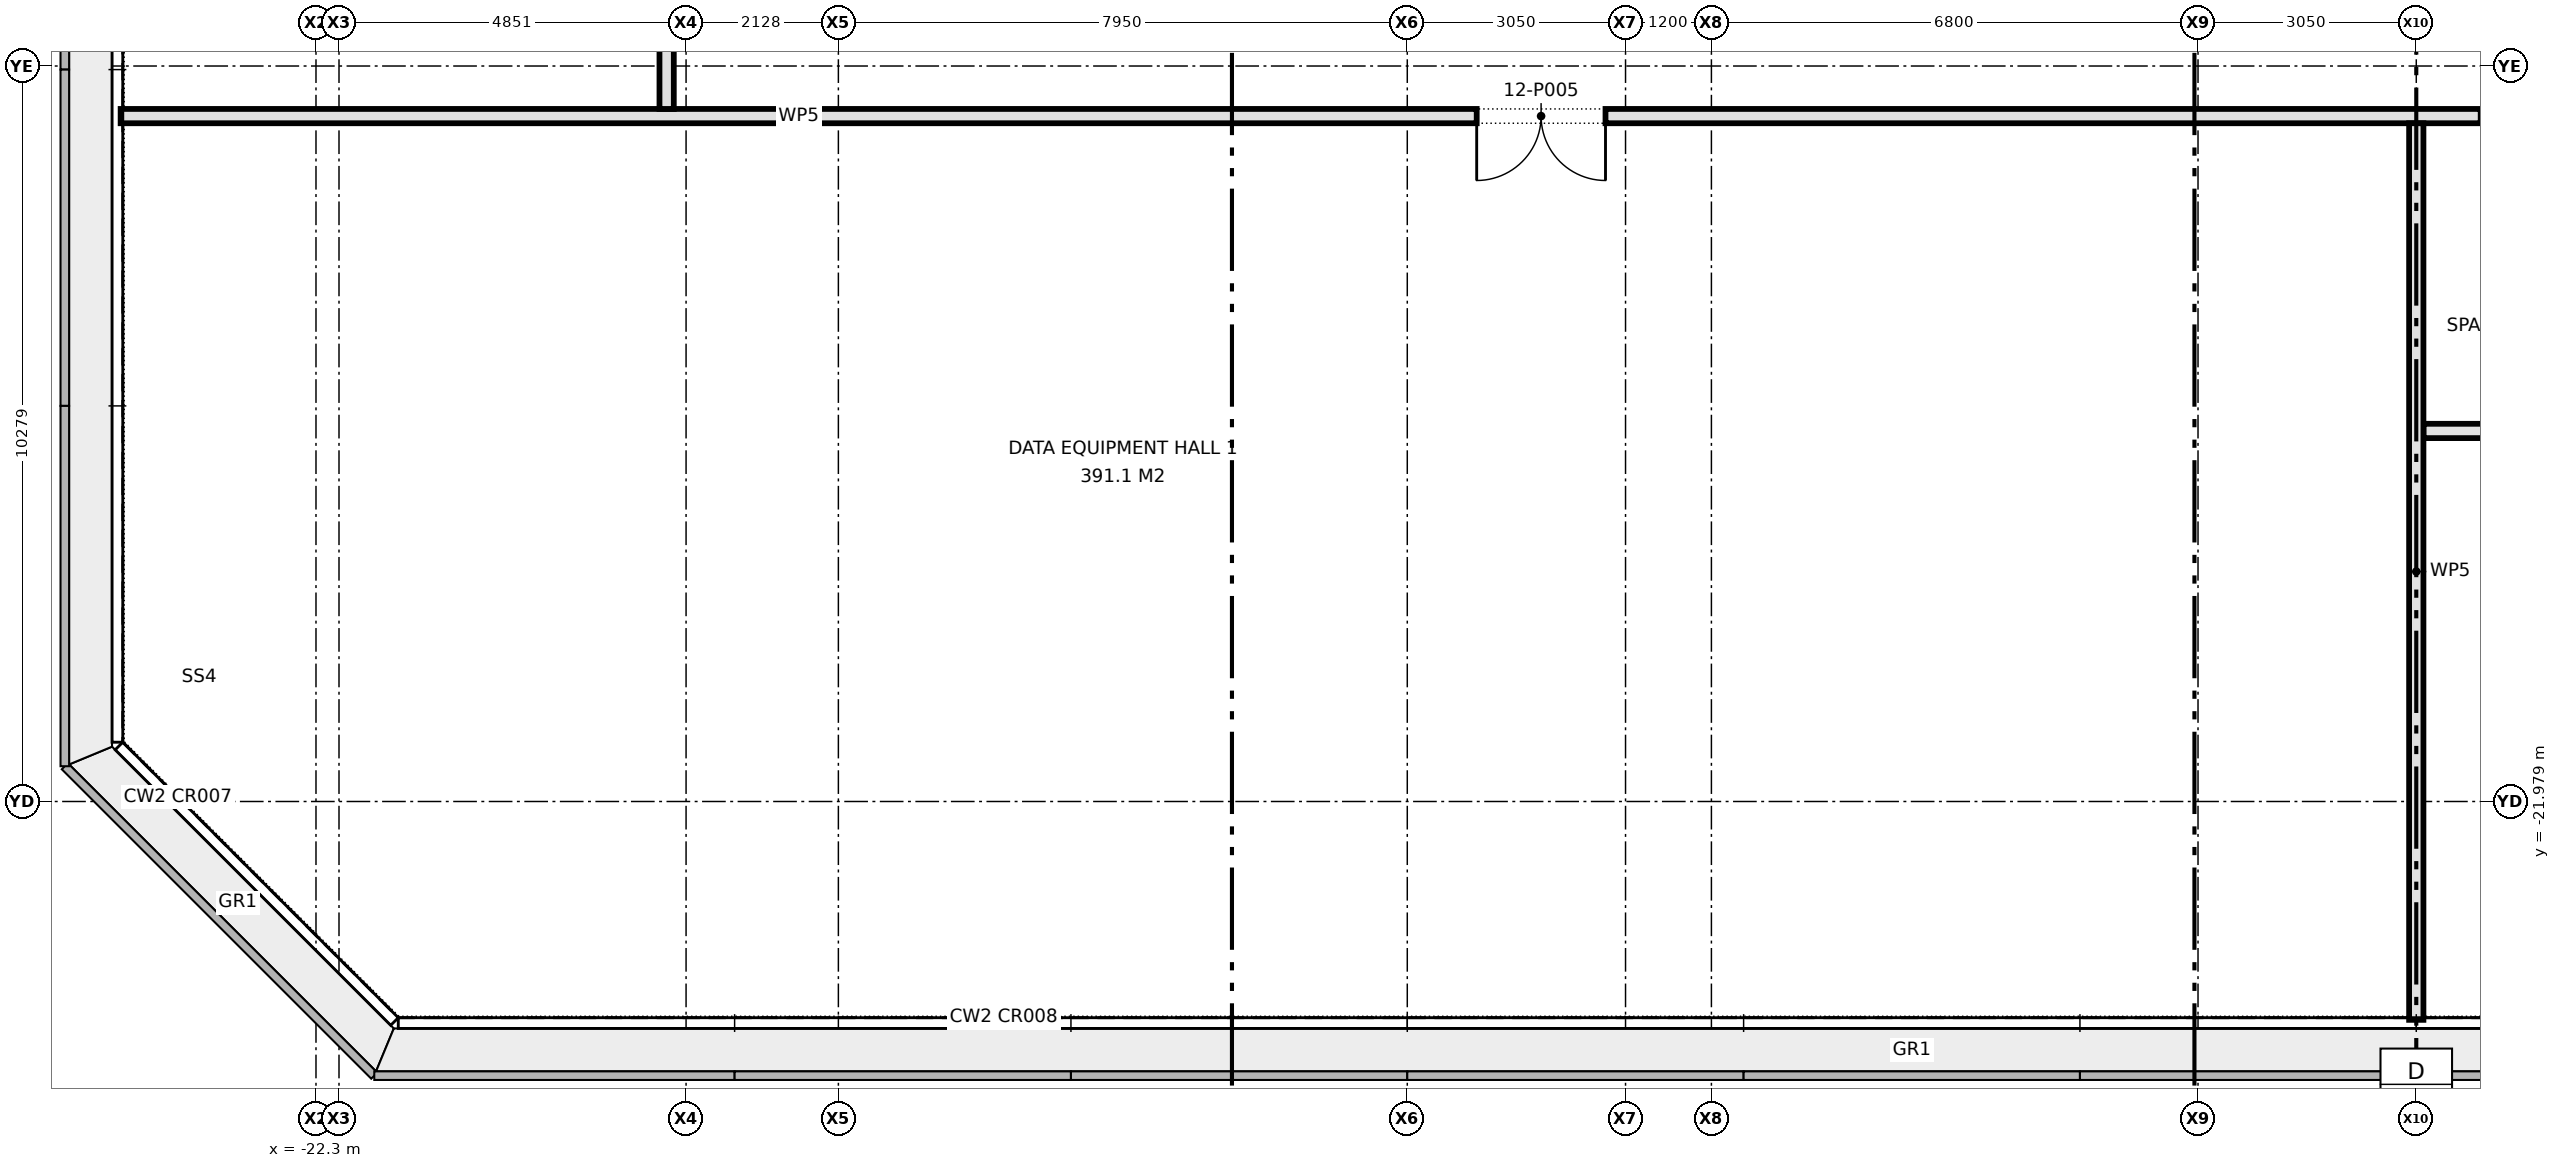
"""IFC4 building model, lengths in metres.
Left out: names, types, materials, properties, quantities, classifications, styles, units other than length and angle.
Written with IfcOpenShell. Run it as: python <this file> out.ifc"""

import sys

from ifc_helpers import new_model, si_unit, direction, frame, frame_2d, origin, place, context, subcontext, project, spatial, rectangle, extrude, element, fill, save


model = new_model("IFC4")
c1 = context("Model", 3, precision=1e-05, world=origin(), true_north=direction((0.0, 1.0)))
c2 = subcontext(c1, "Body", "Model", "MODEL_VIEW")
j1 = project(units=[si_unit("LENGTHUNIT", "METRE"), si_unit("PLANEANGLEUNIT", "RADIAN")], contexts=[c1])
p1 = place(None, origin())
s1 = spatial("IfcSite", under=j1, at=p1, CompositionType="ELEMENT")
p2 = place(p1, origin())
s2 = spatial("IfcBuilding", under=s1, at=p2, CompositionType="ELEMENT")
p3 = place(p2, frame((0.0, 0.0, 54.5)))
s3 = spatial("IfcBuildingStorey", under=s2, at=p3, CompositionType="ELEMENT", Elevation=54.5)
p4 = place(p3, frame((7.15, -16.8, 0.0), z_axis=(0.0, 0.0, 1.0), x_axis=(1.0, 0.0, 0.0)))
e1 = element("IfcWall", 1, at=p4, inside=s3, PredefinedType="PARTITIONING", context=c2, shape_type="SweptSolid", body=[
    extrude(rectangle(XDim=3.0, YDim=0.2, at=frame_2d((1.5, 0.0))), origin(), (0.0, 0.0, 1.0), 4.575),
])
p5 = place(p3, frame((-25.03, -12.4, 0.0), z_axis=(0.0, 0.0, 1.0), x_axis=(1.0, 0.0, 0.0)))
e2 = element("IfcWall", 2, at=p5, inside=s3, PredefinedType="PARTITIONING", context=c2, shape_type="SweptSolid", body=[
    extrude(rectangle(XDim=50.06, YDim=0.2, at=frame_2d((25.03, 0.0))), origin(), (0.0, 0.0, 1.0), 4.575),
])
p6 = place(p5, frame((18.95, 0.0, 0.0)))
e3 = element("IfcOpeningElement", 3, at=p6, cuts=e2, PredefinedType="OPENING", context=c2, shape_type="SweptSolid", body=[
    extrude(rectangle(XDim=1.8, YDim=2.1, at=frame_2d((0.9, 1.05))), frame((0.0, 0.11, 0.0), z_axis=(0.0, -1.0, 0.0), x_axis=(1.0, 0.0, 0.0)), (0.0, 0.0, 1.0), 0.22),
])
p7 = place(p5, frame((37.86, 0.0, 0.0)))
e4 = element("IfcOpeningElement", 4, at=p7, cuts=e2, PredefinedType="OPENING", context=c2, shape_type="SweptSolid", body=[
    extrude(rectangle(XDim=1.8, YDim=2.1, at=frame_2d((0.9, 1.05))), frame((0.0, 0.11, 0.0), z_axis=(0.0, -1.0, 0.0), x_axis=(1.0, 0.0, 0.0)), (0.0, 0.0, 1.0), 0.22),
])
p8 = place(p5, frame((32.98, 0.0, 0.0)))
e5 = element("IfcOpeningElement", 5, at=p8, cuts=e2, PredefinedType="OPENING", context=c2, shape_type="SweptSolid", body=[
    extrude(rectangle(XDim=1.2, YDim=2.1, at=frame_2d((0.6, 1.05))), frame((0.0, 0.11, 0.0), z_axis=(0.0, -1.0, 0.0), x_axis=(1.0, 0.0, 0.0)), (0.0, 0.0, 1.0), 0.22),
])
p9 = place(p3, frame((7.05, -25.03, 0.0), z_axis=(0.0, 0.0, 1.0), x_axis=(0.0, 1.0, 0.0)))
e6 = element("IfcWall", 6, at=p9, inside=s3, PredefinedType="PARTITIONING", context=c2, shape_type="SweptSolid", body=[
    extrude(rectangle(XDim=12.53, YDim=0.2, at=frame_2d((6.265, 0.0))), origin(), (0.0, 0.0, 1.0), 4.575),
])
p10 = place(p3, frame((-17.4, -12.3, 0.0), z_axis=(0.0, 0.0, 1.0), x_axis=(0.0, 1.0, 0.0)))
e7 = element("IfcWall", 7, at=p10, inside=s3, PredefinedType="PARTITIONING", context=c2, shape_type="SweptSolid", body=[
    extrude(rectangle(XDim=28.2, YDim=0.2, at=frame_2d((14.1, 0.0))), origin(), (0.0, 0.0, 1.0), 4.575),
])
p11 = place(p10, frame((4.025, 0.0, 0.0)))
e8 = element("IfcOpeningElement", 8, at=p11, cuts=e7, PredefinedType="OPENING", context=c2, shape_type="SweptSolid", body=[
    extrude(rectangle(XDim=1.8, YDim=2.1, at=frame_2d((0.9, 1.05))), frame((0.0, 0.11, 0.0), z_axis=(0.0, -1.0, 0.0), x_axis=(1.0, 0.0, 0.0)), (0.0, 0.0, 1.0), 0.22),
])
p12 = place(p10, frame((20.525, 0.0, 0.0)))
e9 = element("IfcOpeningElement", 9, at=p12, cuts=e7, PredefinedType="OPENING", context=c2, shape_type="SweptSolid", body=[
    extrude(rectangle(XDim=1.8, YDim=2.1, at=frame_2d((0.9, 1.05))), frame((0.0, 0.11, 0.0), z_axis=(0.0, -1.0, 0.0), x_axis=(1.0, 0.0, 0.0)), (0.0, 0.0, 1.0), 0.22),
])
p13 = place(p10, frame((10.95, 0.0, 0.0)))
e10 = element("IfcOpeningElement", 10, at=p13, cuts=e7, PredefinedType="OPENING", context=c2, shape_type="SweptSolid", body=[
    extrude(rectangle(XDim=1.0, YDim=2.1, at=frame_2d((0.5, 1.05))), frame((0.0, 0.11, 0.0), z_axis=(0.0, -1.0, 0.0), x_axis=(1.0, 0.0, 0.0)), (0.0, 0.0, 1.0), 0.22),
])
p14 = place(p10, frame((13.95, 0.0, 0.0)))
e11 = element("IfcOpeningElement", 11, at=p14, cuts=e7, PredefinedType="OPENING", context=c2, shape_type="SweptSolid", body=[
    extrude(rectangle(XDim=1.0, YDim=2.1, at=frame_2d((0.5, 1.05))), frame((0.0, 0.11, 0.0), z_axis=(0.0, -1.0, 0.0), x_axis=(1.0, 0.0, 0.0)), (0.0, 0.0, 1.0), 0.22),
])
p15 = place(p10, frame((16.55, 0.0, 0.0)))
e12 = element("IfcOpeningElement", 12, at=p15, cuts=e7, PredefinedType="OPENING", context=c2, shape_type="SweptSolid", body=[
    extrude(rectangle(XDim=1.0, YDim=2.1, at=frame_2d((0.5, 1.05))), frame((0.0, 0.11, 0.0), z_axis=(0.0, -1.0, 0.0), x_axis=(1.0, 0.0, 0.0)), (0.0, 0.0, 1.0), 0.22),
])
p16 = place(p6, frame((1.8, 0.0, 0.0), z_axis=(0.0, 0.0, 1.0), x_axis=(-1.0, 0.0, 0.0)))
e13 = element("IfcDoor", 13, at=p16, inside=s3, OperationType="DOUBLE_DOOR_SINGLE_SWING", PredefinedType="DOOR", context=c2, shape_type="SweptSolid", body=[
    extrude(rectangle(XDim=1.8, YDim=2.1, at=frame_2d((0.9, 1.05))), frame((0.0, 0.025, 0.0), z_axis=(0.0, -1.0, 0.0), x_axis=(1.0, 0.0, 0.0)), (0.0, 0.0, 1.0), 0.05),
])
fill(e3, e13)
p17 = place(p8, frame((1.2, 0.0, 0.0), z_axis=(0.0, 0.0, 1.0), x_axis=(-1.0, 0.0, 0.0)))
e14 = element("IfcDoor", 14, at=p17, inside=s3, OperationType="SINGLE_SWING_LEFT", PredefinedType="DOOR", context=c2, shape_type="SweptSolid", body=[
    extrude(rectangle(XDim=1.2, YDim=2.1, at=frame_2d((0.6, 1.05))), frame((0.0, 0.025, 0.0), z_axis=(0.0, -1.0, 0.0), x_axis=(1.0, 0.0, 0.0)), (0.0, 0.0, 1.0), 0.05),
])
fill(e5, e14)
save(model, sys.argv[1])
